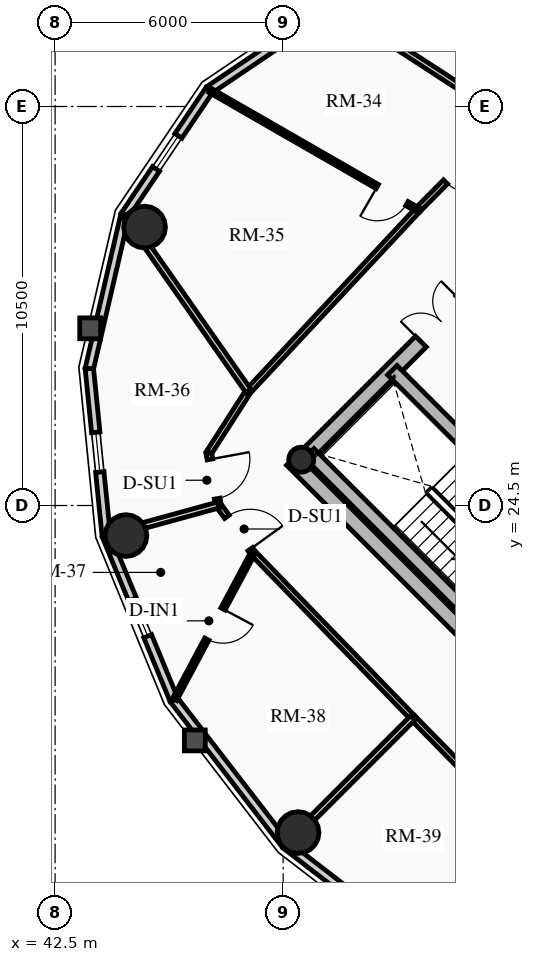
"""IFC4 building model, lengths in metres.
Left out: names, types, materials, properties, quantities, classifications, styles, units other than length and angle.
Written with IfcOpenShell. Run it as: python <this file> out.ifc"""

import sys

from ifc_helpers import new_model, si_unit, direction, frame, frame_2d, origin, origin_2d, place, context, subcontext, project, spatial, rectangle, circle, hollow_circle, extrude, source, transform, mapped, element, fill, save


model = new_model("IFC4")
c1 = context("Model", 3, precision=1e-05, world=origin(), true_north=direction((0.0, 1.0)))
c2 = subcontext(c1, "Body", "Model", "MODEL_VIEW")
j1 = project(units=[si_unit("LENGTHUNIT", "METRE"), si_unit("PLANEANGLEUNIT", "RADIAN")], contexts=[c1])
p1 = place(None, origin())
s1 = spatial("IfcSite", under=j1, at=p1, CompositionType="ELEMENT")
p2 = place(p1, origin())
s2 = spatial("IfcBuilding", under=s1, at=p2, CompositionType="ELEMENT")
p3 = place(p2, frame((0.0, 0.0, 205.39)))
s3 = spatial("IfcBuildingStorey", under=s2, at=p3, CompositionType="ELEMENT", Elevation=205.39)
p4 = place(p3, frame((58.702, 15.732, 0.0), z_axis=(0.0, 0.0, 1.0), x_axis=(-0.707106781187, 0.707106781187, 0.0)))
e1 = element("IfcWall", 1, at=p4, inside=s3, PredefinedType="SHEAR", context=c2, shape_type="SweptSolid", body=[
    extrude(rectangle(XDim=14.1, YDim=0.4, at=frame_2d((7.05, 0.0))), origin(), (0.0, 0.0, 1.0), 2.91),
])
p5 = place(p3, frame((48.873, 25.561, 0.0), z_axis=(0.0, 0.0, 1.0), x_axis=(0.707106781187, 0.707106781187, 0.0)))
e2 = element("IfcWall", 2, at=p5, inside=s3, PredefinedType="SHEAR", context=c2, shape_type="SweptSolid", body=[
    extrude(rectangle(XDim=10.7, YDim=0.4, at=frame_2d((5.35, 0.0))), origin(), (0.0, 0.0, 1.0), 2.91),
])
m1 = source(origin(), c2, "Body", "SweptSolid", [
    extrude(rectangle(XDim=1.5, YDim=2.02, at=frame_2d((0.75, 1.01))), frame((0.0, 0.21, 0.0), z_axis=(0.0, -1.0, 0.0), x_axis=(1.0, 0.0, 0.0)), (0.0, 0.0, 1.0), 0.42),
])
p6 = place(p5, frame((4.6, 0.0, 0.0)))
e3 = element("IfcOpeningElement", 3, at=p6, cuts=e2, PredefinedType="OPENING", context=c2, shape_type="MappedRepresentation", body=[
    mapped(m1, transform((0.0, 0.0, 0.0), x_axis=(1.0, 0.0, 0.0), y_axis=(0.0, 1.0, 0.0), z_axis=(0.0, 0.0, 1.0), scale=1.0)),
])
p7 = place(p3, frame((61.06, 18.373, 0.0), z_axis=(0.0, 0.0, 1.0), x_axis=(-0.707106781187, 0.707106781187, 0.0)))
e4 = element("IfcWall", 4, at=p7, inside=s3, PredefinedType="SHEAR", context=c2, shape_type="SweptSolid", body=[
    extrude(rectangle(XDim=13.7, YDim=0.35, at=frame_2d((6.85, 0.0))), origin(), (0.0, 0.0, 1.0), 2.91),
])
m2 = source(origin(), c2, "Body", "SweptSolid", [
    extrude(rectangle(XDim=1.1, YDim=2.015, at=frame_2d((0.55, 1.007))), frame((0.0, 0.185, 0.0), z_axis=(0.0, -1.0, 0.0), x_axis=(1.0, 0.0, 0.0)), (0.0, 0.0, 1.0), 0.37),
])
p8 = place(p7, frame((4.85, 0.0, 0.0)))
e5 = element("IfcOpeningElement", 5, at=p8, cuts=e4, PredefinedType="OPENING", context=c2, shape_type="MappedRepresentation", body=[
    mapped(m2, transform((0.0, 0.0, 0.0), x_axis=(1.0, 0.0, 0.0), y_axis=(0.0, 1.0, 0.0), z_axis=(0.0, 0.0, 1.0), scale=1.0)),
])
p9 = place(p7, frame((0.625, 0.0, 0.0)))
e6 = element("IfcOpeningElement", 6, at=p9, cuts=e4, PredefinedType="OPENING", context=c2, shape_type="MappedRepresentation", body=[
    mapped(m2, transform((0.0, 0.0, 0.0), x_axis=(1.0, 0.0, 0.0), y_axis=(0.0, 1.0, 0.0), z_axis=(0.0, 0.0, 1.0), scale=1.0)),
])
p10 = place(p7, frame((2.625, 0.0, 0.0)))
e7 = element("IfcOpeningElement", 7, at=p10, cuts=e4, PredefinedType="OPENING", context=c2, shape_type="MappedRepresentation", body=[
    mapped(m2, transform((0.0, 0.0, 0.0), x_axis=(1.0, 0.0, 0.0), y_axis=(0.0, 1.0, 0.0), z_axis=(0.0, 0.0, 1.0), scale=1.0)),
])
m3 = source(origin(), c2, "Body", "SweptSolid", [
    extrude(rectangle(XDim=1.15, YDim=2.02, at=frame_2d((0.575, 1.01))), frame((0.0, 0.185, 0.0), z_axis=(0.0, -1.0, 0.0), x_axis=(1.0, 0.0, 0.0)), (0.0, 0.0, 1.0), 0.37),
])
p11 = place(p7, frame((7.27, 0.0, 0.0)))
e8 = element("IfcOpeningElement", 8, at=p11, cuts=e4, PredefinedType="OPENING", context=c2, shape_type="MappedRepresentation", body=[
    mapped(m3, transform((0.0, 0.0, 0.0), x_axis=(1.0, 0.0, 0.0), y_axis=(0.0, 1.0, 0.0), z_axis=(0.0, 0.0, 1.0), scale=1.0)),
])
p12 = place(p3, frame((53.922, 21.141, 0.0), z_axis=(0.0, 0.0, 1.0), x_axis=(-0.707106781187, 0.707106781187, 0.0)))
e9 = element("IfcWall", 9, at=p12, inside=s3, PredefinedType="SHEAR", context=c2, shape_type="SweptSolid", body=[
    extrude(rectangle(XDim=6.695, YDim=0.35, at=frame_2d((3.348, 0.0))), origin(), (0.0, 0.0, 1.0), 2.91),
])
p13 = place(p3, frame((48.976, 25.706, 0.0), z_axis=(0.0, 0.0, 1.0), x_axis=(0.707106781187, 0.707106781187, 0.0)))
e10 = element("IfcColumn", 10, at=p13, inside=s3, PredefinedType="COLUMN", context=c2, shape_type="SweptSolid", body=[
    extrude(hollow_circle(Radius=0.33, WallThickness=0.025, at=origin_2d()), origin(), (0.0, 0.0, 1.0), 2.91),
])
for number, where, z_axis, x_axis in (
    (11, (44.854, 31.827, 0.0), (0.0, 0.0, 1.0), (1.0, 0.0, 0.0)),
    (12, (44.365, 23.709, 0.0), (0.0, 0.0, 1.0), (1.0, 0.0, 0.0)),
    (13, (48.893, 15.893, 0.0), (0.0, 0.0, 1.0), (1.0, 0.0, 0.0)),
):
    element("IfcColumn", number, at=place(p3, frame(where, z_axis=z_axis, x_axis=x_axis)), inside=s3, PredefinedType="USERDEFINED", context=c2, shape_type="SweptSolid", body=[
        extrude(circle(Radius=0.55, at=origin_2d()), origin(), (0.0, 0.0, 1.0), 2.91),
    ])
p14 = place(p3, frame((46.561, 35.439, 0.0), z_axis=(0.0, 0.0, 1.0), x_axis=(0.828833723692, 0.559495003079, 0.0)))
e14 = element("IfcWall", 14, at=p14, inside=s3, PredefinedType="SOLIDWALL", context=c2, shape_type="SweptSolid", body=[
    extrude(rectangle(XDim=3.976, YDim=0.22, at=frame_2d((1.988, 0.0))), origin(), (0.0, 0.0, 1.0), 2.322),
])
p15 = place(p3, frame((44.337, 32.144, 0.0), z_axis=(0.0, 0.0, 1.0), x_axis=(0.559495003079, 0.828833723692, 0.0)))
e15 = element("IfcWall", 15, at=p15, inside=s3, PredefinedType="SOLIDWALL", context=c2, shape_type="SweptSolid", body=[
    extrude(rectangle(XDim=3.976, YDim=0.22, at=frame_2d((1.988, 0.0))), origin(), (0.0, 0.0, 1.0), 2.322),
])
m4 = source(origin(), c2, "Body", "SweptSolid", [
    extrude(rectangle(XDim=1.05, YDim=1.3, at=frame_2d((0.525, 0.65))), frame((0.0, 0.12, 0.0), z_axis=(0.0, -1.0, 0.0), x_axis=(1.0, 0.0, 0.0)), (0.0, 0.0, 1.0), 0.24),
])
p16 = place(p15, frame((1.463, 0.0, 0.65)))
e16 = element("IfcOpeningElement", 16, at=p16, cuts=e15, PredefinedType="OPENING", context=c2, shape_type="MappedRepresentation", body=[
    mapped(m4, transform((0.0, 0.0, 0.0), x_axis=(1.0, 0.0, 0.0), y_axis=(0.0, 1.0, 0.0), z_axis=(0.0, 0.0, 1.0), scale=1.0)),
])
p17 = place(p3, frame((43.401, 28.1, 0.0), z_axis=(0.0, 0.0, 1.0), x_axis=(0.225473813158, 0.974249228678, 0.0)))
e17 = element("IfcWall", 17, at=p17, inside=s3, PredefinedType="SOLIDWALL", context=c2, shape_type="SweptSolid", body=[
    extrude(rectangle(XDim=4.15, YDim=0.22, at=frame_2d((2.075, 0.0))), origin(), (0.0, 0.0, 1.0), 2.322),
])
p18 = place(p3, frame((43.845, 23.705, 0.0), z_axis=(0.0, 0.0, 1.0), x_axis=(-0.100570534541, 0.994929930991, 0.0)))
e18 = element("IfcWall", 18, at=p18, inside=s3, PredefinedType="SOLIDWALL", context=c2, shape_type="SweptSolid", body=[
    extrude(rectangle(XDim=4.418, YDim=0.22, at=frame_2d((2.209, 0.0))), origin(), (0.0, 0.0, 1.0), 2.322),
])
p19 = place(p18, frame((1.684, 0.0, 0.65)))
e19 = element("IfcOpeningElement", 19, at=p19, cuts=e18, PredefinedType="OPENING", context=c2, shape_type="MappedRepresentation", body=[
    mapped(m4, transform((0.0, 0.0, 0.0), x_axis=(1.0, 0.0, 0.0), y_axis=(0.0, 1.0, 0.0), z_axis=(0.0, 0.0, 1.0), scale=1.0)),
])
p20 = place(p3, frame((45.626, 19.387, 0.0), z_axis=(0.0, 0.0, 1.0), x_axis=(-0.381309704956, 0.924447353237, 0.0)))
e20 = element("IfcWall", 20, at=p20, inside=s3, PredefinedType="SOLIDWALL", context=c2, shape_type="SweptSolid", body=[
    extrude(rectangle(XDim=4.671, YDim=0.22, at=frame_2d((2.335, 0.0))), origin(), (0.0, 0.0, 1.0), 2.322),
])
p21 = place(p20, frame((1.81, 0.0, 0.65)))
e21 = element("IfcOpeningElement", 21, at=p21, cuts=e20, PredefinedType="OPENING", context=c2, shape_type="MappedRepresentation", body=[
    mapped(m4, transform((0.0, 0.0, 0.0), x_axis=(1.0, 0.0, 0.0), y_axis=(0.0, 1.0, 0.0), z_axis=(0.0, 0.0, 1.0), scale=1.0)),
])
p22 = place(p3, frame((48.569, 15.569, 0.0), z_axis=(0.0, 0.0, 1.0), x_axis=(-0.610523083886, 0.791998462147, 0.0)))
e22 = element("IfcWall", 22, at=p22, inside=s3, PredefinedType="SOLIDWALL", context=c2, shape_type="SweptSolid", body=[
    extrude(rectangle(XDim=4.82, YDim=0.22, at=frame_2d((2.41, 0.0))), origin(), (0.0, 0.0, 1.0), 2.322),
])
p23 = place(p3, frame((52.387, 12.626, 0.0), z_axis=(0.0, 0.0, 1.0), x_axis=(-0.791998462147, 0.610523083886, 0.0)))
e23 = element("IfcWall", 23, at=p23, inside=s3, PredefinedType="SOLIDWALL", context=c2, shape_type="SweptSolid", body=[
    extrude(rectangle(XDim=4.82, YDim=0.22, at=frame_2d((2.41, 0.0))), origin(), (0.0, 0.0, 1.0), 2.322),
])
p24 = place(p23, frame((1.885, 0.0, 0.65)))
e24 = element("IfcOpeningElement", 24, at=p24, cuts=e23, PredefinedType="OPENING", context=c2, shape_type="MappedRepresentation", body=[
    mapped(m4, transform((0.0, 0.0, 0.0), x_axis=(1.0, 0.0, 0.0), y_axis=(0.0, 1.0, 0.0), z_axis=(0.0, 0.0, 1.0), scale=1.0)),
])
p25 = place(p3, frame((54.427, 34.683, 0.0), z_axis=(0.0, 0.0, 1.0), x_axis=(-0.704178989986, -0.710022499687, 0.0)))
e25 = element("IfcWall", 25, at=p25, inside=s3, PredefinedType="PARTITIONING", context=c2, shape_type="SweptSolid", body=[
    extrude(rectangle(XDim=3.384, YDim=0.15, at=frame_2d((1.692, 0.0))), origin(), (0.0, 0.0, 1.0), 2.322),
])
m5 = source(origin(), c2, "Body", "SweptSolid", [
    extrude(rectangle(XDim=1.05, YDim=2.015, at=frame_2d((0.525, 1.007))), frame((0.0, 0.085, 0.0), z_axis=(0.0, -1.0, 0.0), x_axis=(1.0, 0.0, 0.0)), (0.0, 0.0, 1.0), 0.17),
])
p26 = place(p25, frame((1.298, 0.0, 0.0)))
e26 = element("IfcOpeningElement", 26, at=p26, cuts=e25, PredefinedType="OPENING", context=c2, shape_type="MappedRepresentation", body=[
    mapped(m5, transform((0.0, 0.0, 0.0), x_axis=(1.0, 0.0, 0.0), y_axis=(0.0, 1.0, 0.0), z_axis=(0.0, 0.0, 1.0), scale=1.0)),
])
p27 = place(p3, frame((52.043, 32.28, 0.0), z_axis=(0.0, 0.0, 1.0), x_axis=(-0.682606081633, -0.730786519661, 0.0)))
e27 = element("IfcWall", 27, at=p27, inside=s3, PredefinedType="PARTITIONING", context=c2, shape_type="SweptSolid", body=[
    extrude(rectangle(XDim=6.527, YDim=0.15, at=frame_2d((3.263, 0.0))), origin(), (0.0, 0.0, 1.0), 2.255),
])
p28 = place(p3, frame((47.588, 27.51, 0.0), z_axis=(0.0, 0.0, 1.0), x_axis=(-0.540202619347, -0.841534984449, 0.0)))
e28 = element("IfcWall", 28, at=p28, inside=s3, PredefinedType="PARTITIONING", context=c2, shape_type="SweptSolid", body=[
    extrude(rectangle(XDim=1.935, YDim=0.15, at=frame_2d((0.967, 0.0))), origin(), (0.0, 0.0, 1.0), 2.255),
])
p29 = place(p3, frame((46.543, 25.882, 0.0), z_axis=(0.0, 0.0, 1.0), x_axis=(0.181153502579, -0.983454832976, 0.0)))
e29 = element("IfcWall", 29, at=p29, inside=s3, PredefinedType="PARTITIONING", context=c2, shape_type="SweptSolid", body=[
    extrude(rectangle(XDim=1.392, YDim=0.15, at=frame_2d((0.696, 0.0))), origin(), (0.0, 0.0, 1.0), 2.322),
])
p30 = place(p29, frame((0.171, 0.0, 0.0)))
e30 = element("IfcOpeningElement", 30, at=p30, cuts=e29, PredefinedType="OPENING", context=c2, shape_type="MappedRepresentation", body=[
    mapped(m5, transform((0.0, 0.0, 0.0), x_axis=(1.0, 0.0, 0.0), y_axis=(0.0, 1.0, 0.0), z_axis=(0.0, 0.0, 1.0), scale=1.0)),
])
p31 = place(p3, frame((46.795, 24.513, 0.0), z_axis=(0.0, 0.0, 1.0), x_axis=(0.585628197524, -0.810579801294, 0.0)))
e31 = element("IfcWall", 31, at=p31, inside=s3, PredefinedType="PARTITIONING", context=c2, shape_type="SweptSolid", body=[
    extrude(rectangle(XDim=1.554, YDim=0.15, at=frame_2d((0.777, 0.0))), origin(), (0.0, 0.0, 1.0), 2.255),
])
p32 = place(p31, frame((0.384, 0.0, 0.0)))
e32 = element("IfcOpeningElement", 32, at=p32, cuts=e31, PredefinedType="OPENING", context=c2, shape_type="MappedRepresentation", body=[
    mapped(m5, transform((0.0, 0.0, 0.0), x_axis=(1.0, 0.0, 0.0), y_axis=(0.0, 1.0, 0.0), z_axis=(0.0, 0.0, 1.0), scale=1.0)),
])
p33 = place(p3, frame((47.706, 23.253, 0.0), z_axis=(0.0, 0.0, 1.0), x_axis=(0.696179266346, -0.717867974707, 0.0)))
e33 = element("IfcWall", 33, at=p33, inside=s3, PredefinedType="PARTITIONING", context=c2, shape_type="SweptSolid", body=[
    extrude(rectangle(XDim=6.045, YDim=0.15, at=frame_2d((3.022, 0.0))), origin(), (0.0, 0.0, 1.0), 2.255),
])
p34 = place(p3, frame((51.914, 18.914, 0.0), z_axis=(0.0, 0.0, 1.0), x_axis=(0.699999313799, -0.714143515465, 0.0)))
e34 = element("IfcWall", 34, at=p34, inside=s3, PredefinedType="PARTITIONING", context=c2, shape_type="SweptSolid", body=[
    extrude(rectangle(XDim=6.162, YDim=0.15, at=frame_2d((3.081, 0.0))), origin(), (0.0, 0.0, 1.0), 2.255),
])
p35 = place(p3, frame((54.427, 34.683, 0.0), z_axis=(0.0, 0.0, 1.0), x_axis=(-0.83860663594, 0.544737469023, 0.0)))
e35 = element("IfcWall", 35, at=p35, inside=s3, PredefinedType="PARTITIONING", context=c2, shape_type="SweptSolid", body=[
    extrude(rectangle(XDim=5.439, YDim=0.16, at=frame_2d((2.72, 0.0))), origin(), (0.0, 0.0, 1.0), 2.322),
])
p36 = place(p3, frame((47.588, 27.51, 0.0), z_axis=(0.0, 0.0, 1.0), x_axis=(-0.573073195236, 0.819504187239, 0.0)))
e36 = element("IfcWall", 36, at=p36, inside=s3, PredefinedType="PARTITIONING", context=c2, shape_type="SweptSolid", body=[
    extrude(rectangle(XDim=5.643, YDim=0.16, at=frame_2d((2.822, 0.0))), origin(), (0.0, 0.0, 1.0), 2.322),
])
p37 = place(p3, frame((46.795, 24.513, 0.0), z_axis=(0.0, 0.0, 1.0), x_axis=(-0.964263392178, -0.264945485912, 0.0)))
e37 = element("IfcWall", 37, at=p37, inside=s3, PredefinedType="PARTITIONING", context=c2, shape_type="SweptSolid", body=[
    extrude(rectangle(XDim=3.039, YDim=0.16, at=frame_2d((1.52, 0.0))), origin(), (0.0, 0.0, 1.0), 2.322),
])
p38 = place(p3, frame((51.914, 18.914, 0.0), z_axis=(0.0, 0.0, 1.0), x_axis=(-0.707106781187, -0.707106781187, 0.0)))
e38 = element("IfcWall", 38, at=p38, inside=s3, PredefinedType="PARTITIONING", context=c2, shape_type="SweptSolid", body=[
    extrude(rectangle(XDim=4.71, YDim=0.16, at=frame_2d((2.355, 0.0))), origin(), (0.0, 0.0, 1.0), 2.322),
])
p39 = place(p3, frame((52.043, 32.28, 0.0), z_axis=(0.0, 0.0, 1.0), x_axis=(-0.866853616581, 0.498562741709, 0.0)))
e39 = element("IfcWall", 39, at=p39, inside=s3, PredefinedType="PARTITIONING", context=c2, shape_type="SweptSolid", body=[
    extrude(rectangle(XDim=6.308, YDim=0.125, at=frame_2d((3.154, 0.0))), origin(), (0.0, 0.0, 1.0), 2.322),
])
m6 = source(origin(), c2, "Body", "SweptSolid", [
    extrude(rectangle(XDim=0.9, YDim=2.005, at=frame_2d((0.45, 1.002))), frame((0.0, 0.073, 0.0), z_axis=(0.0, -1.0, 0.0), x_axis=(1.0, 0.0, 0.0)), (0.0, 0.0, 1.0), 0.145),
])
p40 = place(p39, frame((0.33, 0.0, 0.0)))
e40 = element("IfcOpeningElement", 40, at=p40, cuts=e39, PredefinedType="OPENING", context=c2, shape_type="MappedRepresentation", body=[
    mapped(m6, transform((0.0, 0.0, 0.0), x_axis=(1.0, 0.0, 0.0), y_axis=(0.0, 1.0, 0.0), z_axis=(0.0, 0.0, 1.0), scale=1.0)),
])
p41 = place(p3, frame((47.706, 23.253, 0.0), z_axis=(0.0, 0.0, 1.0), x_axis=(-0.471384756618, -0.881927667799, 0.0)))
e41 = element("IfcWall", 41, at=p41, inside=s3, PredefinedType="PARTITIONING", context=c2, shape_type="SweptSolid", body=[
    extrude(rectangle(XDim=4.374, YDim=0.125, at=frame_2d((2.187, 0.0))), origin(), (0.0, 0.0, 1.0), 2.255),
])
p42 = place(p41, frame((1.674, 0.0, 0.0)))
e42 = element("IfcOpeningElement", 42, at=p42, cuts=e41, PredefinedType="OPENING", context=c2, shape_type="MappedRepresentation", body=[
    mapped(m6, transform((0.0, 0.0, 0.0), x_axis=(1.0, 0.0, 0.0), y_axis=(0.0, 1.0, 0.0), z_axis=(0.0, 0.0, 1.0), scale=1.0)),
])
m7 = source(origin(), c2, "Body", "SweptSolid", [
    extrude(rectangle(XDim=1.05, YDim=1.3, at=frame_2d((0.525, 0.65))), frame((0.0, 0.03, 0.0), z_axis=(0.0, -1.0, 0.0), x_axis=(1.0, 0.0, 0.0)), (0.0, 0.0, 1.0), 0.06),
])
p43 = place(p16, origin())
e43 = element("IfcWindow", 43, at=p43, inside=s3, PartitioningType="SINGLE_PANEL", PredefinedType="WINDOW", context=c2, shape_type="MappedRepresentation", body=[
    mapped(m7, transform((0.0, 0.0, 0.0), x_axis=(1.0, 0.0, 0.0), y_axis=(0.0, 1.0, 0.0), z_axis=(0.0, 0.0, 1.0), scale=1.0)),
])
fill(e16, e43)
p44 = place(p19, origin())
e44 = element("IfcWindow", 44, at=p44, inside=s3, PartitioningType="SINGLE_PANEL", PredefinedType="WINDOW", context=c2, shape_type="MappedRepresentation", body=[
    mapped(m7, transform((0.0, 0.0, 0.0), x_axis=(1.0, 0.0, 0.0), y_axis=(0.0, 1.0, 0.0), z_axis=(0.0, 0.0, 1.0), scale=1.0)),
])
fill(e19, e44)
p45 = place(p21, origin())
e45 = element("IfcWindow", 45, at=p45, inside=s3, PartitioningType="SINGLE_PANEL", PredefinedType="WINDOW", context=c2, shape_type="MappedRepresentation", body=[
    mapped(m7, transform((0.0, 0.0, 0.0), x_axis=(1.0, 0.0, 0.0), y_axis=(0.0, 1.0, 0.0), z_axis=(0.0, 0.0, 1.0), scale=1.0)),
])
fill(e21, e45)
m8 = source(origin(), c2, "Body", "SweptSolid", [
    extrude(rectangle(XDim=1.5, YDim=2.02, at=frame_2d((0.75, 1.01))), frame((0.0, 0.025, 0.0), z_axis=(0.0, -1.0, 0.0), x_axis=(1.0, 0.0, 0.0)), (0.0, 0.0, 1.0), 0.05),
])
p46 = place(p6, origin())
e46 = element("IfcDoor", 46, at=p46, inside=s3, OperationType="DOUBLE_DOOR_SINGLE_SWING", PredefinedType="DOOR", context=c2, shape_type="MappedRepresentation", body=[
    mapped(m8, transform((0.0, 0.0, 0.0), x_axis=(1.0, 0.0, 0.0), y_axis=(0.0, 1.0, 0.0), z_axis=(0.0, 0.0, 1.0), scale=1.0)),
])
fill(e3, e46)
m9 = source(origin(), c2, "Body", "SweptSolid", [
    extrude(rectangle(XDim=1.05, YDim=2.015, at=frame_2d((0.525, 1.007))), frame((0.0, 0.025, 0.0), z_axis=(0.0, -1.0, 0.0), x_axis=(1.0, 0.0, 0.0)), (0.0, 0.0, 1.0), 0.05),
])
p47 = place(p26, origin())
e47 = element("IfcDoor", 47, at=p47, inside=s3, OperationType="SINGLE_SWING_LEFT", PredefinedType="DOOR", context=c2, shape_type="MappedRepresentation", body=[
    mapped(m9, transform((0.0, 0.0, 0.0), x_axis=(1.0, 0.0, 0.0), y_axis=(0.0, 1.0, 0.0), z_axis=(0.0, 0.0, 1.0), scale=1.0)),
])
fill(e26, e47)
m10 = source(origin(), c2, "Body", "SweptSolid", [
    extrude(rectangle(XDim=0.9, YDim=2.005, at=frame_2d((0.45, 1.002))), frame((0.0, 0.025, 0.0), z_axis=(0.0, -1.0, 0.0), x_axis=(1.0, 0.0, 0.0)), (0.0, 0.0, 1.0), 0.05),
])
p48 = place(p40, origin())
e48 = element("IfcDoor", 48, at=p48, inside=s3, OperationType="SINGLE_SWING_RIGHT", PredefinedType="DOOR", context=c2, shape_type="MappedRepresentation", body=[
    mapped(m10, transform((0.0, 0.0, 0.0), x_axis=(1.0, 0.0, 0.0), y_axis=(0.0, 1.0, 0.0), z_axis=(0.0, 0.0, 1.0), scale=1.0)),
])
fill(e40, e48)
p49 = place(p30, origin())
e49 = element("IfcDoor", 49, at=p49, inside=s3, OperationType="SINGLE_SWING_LEFT", PredefinedType="DOOR", context=c2, shape_type="MappedRepresentation", body=[
    mapped(m9, transform((0.0, 0.0, 0.0), x_axis=(1.0, 0.0, 0.0), y_axis=(0.0, 1.0, 0.0), z_axis=(0.0, 0.0, 1.0), scale=1.0)),
])
fill(e30, e49)
p50 = place(p32, origin())
e50 = element("IfcDoor", 50, at=p50, inside=s3, OperationType="SINGLE_SWING_RIGHT", PredefinedType="DOOR", context=c2, shape_type="MappedRepresentation", body=[
    mapped(m9, transform((0.0, 0.0, 0.0), x_axis=(1.0, 0.0, 0.0), y_axis=(0.0, 1.0, 0.0), z_axis=(0.0, 0.0, 1.0), scale=1.0)),
])
fill(e32, e50)
p51 = place(p42, origin())
e51 = element("IfcDoor", 51, at=p51, inside=s3, OperationType="SINGLE_SWING_LEFT", PredefinedType="DOOR", context=c2, shape_type="MappedRepresentation", body=[
    mapped(m10, transform((0.0, 0.0, 0.0), x_axis=(1.0, 0.0, 0.0), y_axis=(0.0, 1.0, 0.0), z_axis=(0.0, 0.0, 1.0), scale=1.0)),
])
fill(e42, e51)
save(model, sys.argv[1])
